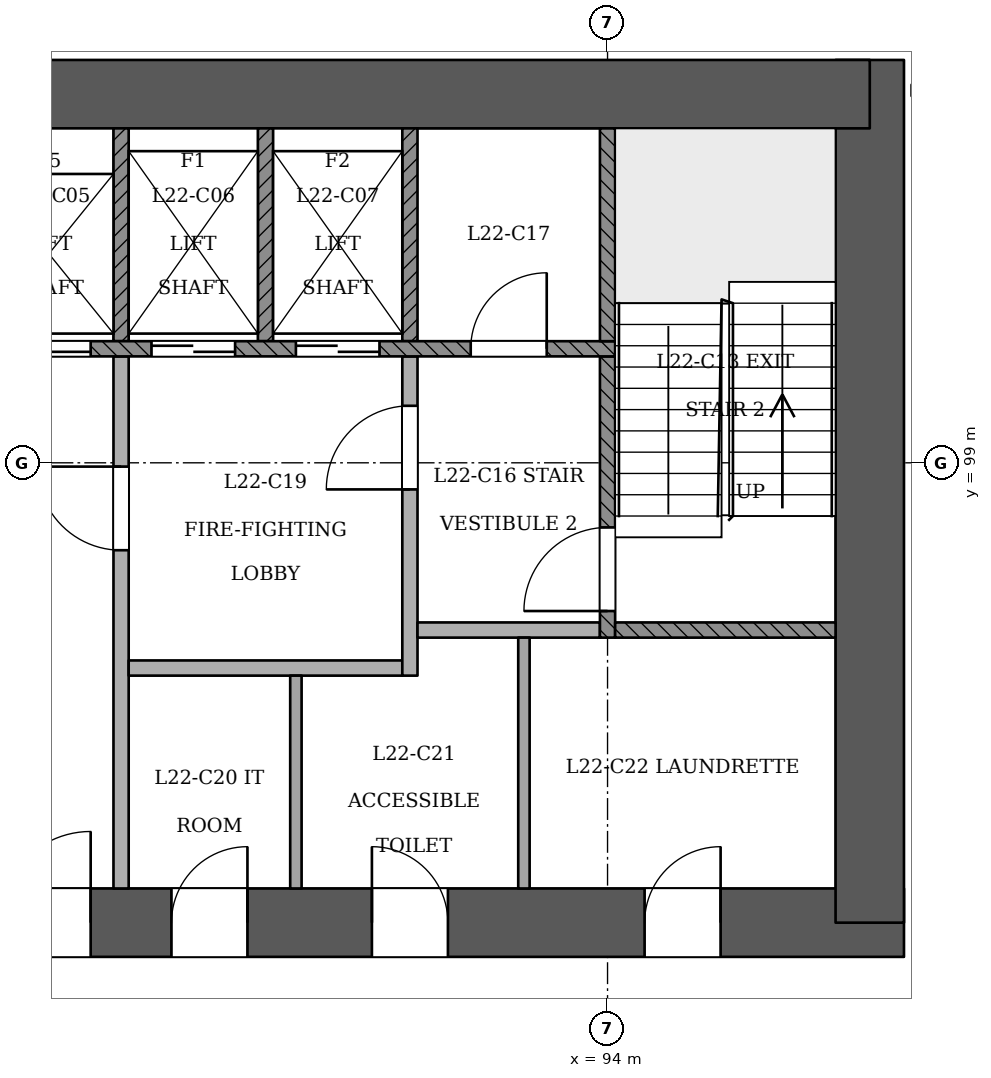
"""IFC4 building model, lengths in metres.
Left out: names, types, materials, properties, quantities, classifications, styles, units other than length and angle.
Written with IfcOpenShell. Run it as: python <this file> out.ifc"""

import sys

from ifc_helpers import new_model, si_unit, direction, frame, frame_2d, origin, place, context, subcontext, project, spatial, rectangle, extrude, element, fill, save


model = new_model("IFC4")
c1 = context("Model", 3, precision=1e-05, world=origin(), true_north=direction((0.0, 1.0)))
c2 = subcontext(c1, "Body", "Model", "MODEL_VIEW")
j1 = project(units=[si_unit("LENGTHUNIT", "METRE"), si_unit("PLANEANGLEUNIT", "RADIAN")], contexts=[c1])
p1 = place(None, origin())
s1 = spatial("IfcSite", under=j1, at=p1, CompositionType="ELEMENT")
p2 = place(p1, origin())
s2 = spatial("IfcBuilding", under=s1, at=p2, CompositionType="ELEMENT")
p3 = place(p2, frame((0.0, 0.0, 88.2)))
s3 = spatial("IfcBuildingStorey", under=s2, at=p3, CompositionType="ELEMENT", Elevation=88.2)
p4 = place(p3, frame((72.55, 92.95, 0.0), z_axis=(0.0, 0.0, 1.0), x_axis=(1.0, 0.0, 0.0)))
e1 = element("IfcWall", 1, at=p4, inside=s3, PredefinedType="SHEAR", context=c2, shape_type="SweptSolid", body=[
    extrude(rectangle(XDim=25.35, YDim=0.9, at=frame_2d((12.675, 0.0))), origin(), (0.0, 0.0, 1.0), 3.6),
])
p5 = place(p4, frame((1.25, 0.0, 0.0)))
e2 = element("IfcOpeningElement", 2, at=p5, cuts=e1, PredefinedType="OPENING", context=c2, shape_type="SweptSolid", body=[
    extrude(rectangle(XDim=1.2, YDim=2.1, at=frame_2d((0.6, 1.05))), frame((0.0, 0.46, 0.0), z_axis=(0.0, -1.0, 0.0), x_axis=(1.0, 0.0, 0.0)), (0.0, 0.0, 1.0), 0.921),
])
p6 = place(p4, frame((3.45, 0.0, 0.0)))
e3 = element("IfcOpeningElement", 3, at=p6, cuts=e1, PredefinedType="OPENING", context=c2, shape_type="SweptSolid", body=[
    extrude(rectangle(XDim=1.2, YDim=2.1, at=frame_2d((0.6, 1.05))), frame((0.0, 0.46, 0.0), z_axis=(0.0, -1.0, 0.0), x_axis=(1.0, 0.0, 0.0)), (0.0, 0.0, 1.0), 0.921),
])
p7 = place(p4, frame((13.45, 0.0, 0.0)))
e4 = element("IfcOpeningElement", 4, at=p7, cuts=e1, PredefinedType="OPENING", context=c2, shape_type="SweptSolid", body=[
    extrude(rectangle(XDim=1.2, YDim=2.1, at=frame_2d((0.6, 1.05))), frame((0.0, 0.46, 0.0), z_axis=(0.0, -1.0, 0.0), x_axis=(1.0, 0.0, 0.0)), (0.0, 0.0, 1.0), 0.921),
])
p8 = place(p4, frame((15.712, 0.0, 0.0)))
e5 = element("IfcOpeningElement", 5, at=p8, cuts=e1, PredefinedType="OPENING", context=c2, shape_type="SweptSolid", body=[
    extrude(rectangle(XDim=1.0, YDim=2.1, at=frame_2d((0.5, 1.05))), frame((0.0, 0.46, 0.0), z_axis=(0.0, -1.0, 0.0), x_axis=(1.0, 0.0, 0.0)), (0.0, 0.0, 1.0), 0.921),
])
p9 = place(p4, frame((18.35, 0.0, 0.0)))
e6 = element("IfcOpeningElement", 6, at=p9, cuts=e1, PredefinedType="OPENING", context=c2, shape_type="SweptSolid", body=[
    extrude(rectangle(XDim=1.0, YDim=2.1, at=frame_2d((0.5, 1.05))), frame((0.0, 0.46, 0.0), z_axis=(0.0, -1.0, 0.0), x_axis=(1.0, 0.0, 0.0)), (0.0, 0.0, 1.0), 0.921),
])
p10 = place(p4, frame((21.938, 0.0, 0.0)))
e7 = element("IfcOpeningElement", 7, at=p10, cuts=e1, PredefinedType="OPENING", context=c2, shape_type="SweptSolid", body=[
    extrude(rectangle(XDim=1.0, YDim=2.1, at=frame_2d((0.5, 1.05))), frame((0.0, 0.46, 0.0), z_axis=(0.0, -1.0, 0.0), x_axis=(1.0, 0.0, 0.0)), (0.0, 0.0, 1.0), 0.921),
])
p11 = place(p3, frame((97.45, 92.95, 0.0), z_axis=(0.0, 0.0, 1.0), x_axis=(0.0, 1.0, 0.0)))
e8 = element("IfcWall", 8, at=p11, inside=s3, PredefinedType="SHEAR", context=c2, shape_type="SweptSolid", body=[
    extrude(rectangle(XDim=11.35, YDim=0.9, at=frame_2d((5.675, 0.0))), origin(), (0.0, 0.0, 1.0), 3.6),
])
p12 = place(p3, frame((97.45, 103.85, 0.0), z_axis=(0.0, 0.0, 1.0), x_axis=(-1.0, 0.0, 0.0)))
e9 = element("IfcWall", 9, at=p12, inside=s3, PredefinedType="SHEAR", context=c2, shape_type="SweptSolid", body=[
    extrude(rectangle(XDim=25.35, YDim=0.9, at=frame_2d((12.675, 0.0))), origin(), (0.0, 0.0, 1.0), 3.6),
])
p13 = place(p3, frame((87.198, 63.517, 0.0), z_axis=(0.0, 0.0, 1.0), x_axis=(0.499999136801, 0.866025902152, 0.0)))
e10 = element("IfcWall", 10, at=p13, inside=s3, PredefinedType="PARTITIONING", context=c2, shape_type="SweptSolid", body=[
    extrude(rectangle(XDim=39.209, YDim=0.15, at=frame_2d((19.604, 0.0))), origin(), (0.0, 0.0, 1.0), 2.7),
])
p14 = place(p13, frame((2.8, 0.0, 0.0)))
e11 = element("IfcOpeningElement", 11, at=p14, cuts=e10, PredefinedType="OPENING", context=c2, shape_type="SweptSolid", body=[
    extrude(rectangle(XDim=1.2, YDim=2.1, at=frame_2d((0.6, 1.05))), frame((0.0, 0.085, 0.0), z_axis=(0.0, -1.0, 0.0), x_axis=(1.0, 0.0, 0.0)), (0.0, 0.0, 1.0), 0.171),
])
p15 = place(p13, frame((9.72, 0.0, 0.0)))
e12 = element("IfcOpeningElement", 12, at=p15, cuts=e10, PredefinedType="OPENING", context=c2, shape_type="SweptSolid", body=[
    extrude(rectangle(XDim=1.0, YDim=2.1, at=frame_2d((0.5, 1.05))), frame((0.0, 0.085, 0.0), z_axis=(0.0, -1.0, 0.0), x_axis=(1.0, 0.0, 0.0)), (0.0, 0.0, 1.0), 0.171),
])
p16 = place(p13, frame((16.395, 0.0, 0.0)))
e13 = element("IfcOpeningElement", 13, at=p16, cuts=e10, PredefinedType="OPENING", context=c2, shape_type="SweptSolid", body=[
    extrude(rectangle(XDim=1.0, YDim=2.1, at=frame_2d((0.5, 1.05))), frame((0.0, 0.085, 0.0), z_axis=(0.0, -1.0, 0.0), x_axis=(1.0, 0.0, 0.0)), (0.0, 0.0, 1.0), 0.171),
])
p17 = place(p13, frame((19.75, 0.0, 0.0)))
e14 = element("IfcOpeningElement", 14, at=p17, cuts=e10, PredefinedType="OPENING", context=c2, shape_type="SweptSolid", body=[
    extrude(rectangle(XDim=1.0, YDim=2.1, at=frame_2d((0.5, 1.05))), frame((0.0, 0.085, 0.0), z_axis=(0.0, -1.0, 0.0), x_axis=(1.0, 0.0, 0.0)), (0.0, 0.0, 1.0), 0.171),
])
p18 = place(p13, frame((25.395, 0.0, 0.0)))
e15 = element("IfcOpeningElement", 15, at=p18, cuts=e10, PredefinedType="OPENING", context=c2, shape_type="SweptSolid", body=[
    extrude(rectangle(XDim=1.0, YDim=2.1, at=frame_2d((0.5, 1.05))), frame((0.0, 0.085, 0.0), z_axis=(0.0, -1.0, 0.0), x_axis=(1.0, 0.0, 0.0)), (0.0, 0.0, 1.0), 0.171),
])
p19 = place(p13, frame((29.8, 0.0, 0.0)))
e16 = element("IfcOpeningElement", 16, at=p19, cuts=e10, PredefinedType="OPENING", context=c2, shape_type="SweptSolid", body=[
    extrude(rectangle(XDim=1.2, YDim=2.1, at=frame_2d((0.6, 1.05))), frame((0.0, 0.085, 0.0), z_axis=(0.0, -1.0, 0.0), x_axis=(1.0, 0.0, 0.0)), (0.0, 0.0, 1.0), 0.171),
])
p20 = place(p13, frame((37.225, 0.0, 0.0)))
e17 = element("IfcOpeningElement", 17, at=p20, cuts=e10, PredefinedType="OPENING", context=c2, shape_type="SweptSolid", body=[
    extrude(rectangle(XDim=1.0, YDim=2.1, at=frame_2d((0.5, 1.05))), frame((0.0, 0.085, 0.0), z_axis=(0.0, -1.0, 0.0), x_axis=(1.0, 0.0, 0.0)), (0.0, 0.0, 1.0), 0.171),
])
p21 = place(p3, frame((87.6, 93.4, 0.0), z_axis=(0.0, 0.0, 1.0), x_axis=(0.0, 1.0, 0.0)))
e18 = element("IfcWall", 18, at=p21, inside=s3, PredefinedType="PARTITIONING", context=c2, shape_type="SweptSolid", body=[
    extrude(rectangle(XDim=7.0, YDim=0.2, at=frame_2d((3.5, 0.0))), origin(), (0.0, 0.0, 1.0), 3.1),
])
p22 = place(p21, frame((4.45, 0.0, 0.0)))
e19 = element("IfcOpeningElement", 19, at=p22, cuts=e18, PredefinedType="OPENING", context=c2, shape_type="SweptSolid", body=[
    extrude(rectangle(XDim=1.1, YDim=2.1, at=frame_2d((0.55, 1.05))), frame((0.0, 0.11, 0.0), z_axis=(0.0, -1.0, 0.0), x_axis=(1.0, 0.0, 0.0)), (0.0, 0.0, 1.0), 0.221),
])
p23 = place(p3, frame((89.9, 93.4, 0.0), z_axis=(0.0, 0.0, 1.0), x_axis=(0.0, 1.0, 0.0)))
e20 = element("IfcWall", 20, at=p23, inside=s3, PredefinedType="PARTITIONING", context=c2, shape_type="SweptSolid", body=[
    extrude(rectangle(XDim=2.8, YDim=0.15, at=frame_2d((1.4, 0.0))), origin(), (0.0, 0.0, 1.0), 3.1),
])
p24 = place(p3, frame((92.9, 93.4, 0.0), z_axis=(0.0, 0.0, 1.0), x_axis=(0.0, 1.0, 0.0)))
e21 = element("IfcWall", 21, at=p24, inside=s3, PredefinedType="PARTITIONING", context=c2, shape_type="SweptSolid", body=[
    extrude(rectangle(XDim=3.3, YDim=0.15, at=frame_2d((1.65, 0.0))), origin(), (0.0, 0.0, 1.0), 3.1),
])
p25 = place(p3, frame((87.7, 96.3, 0.0), z_axis=(0.0, 0.0, 1.0), x_axis=(1.0, 0.0, 0.0)))
e22 = element("IfcWall", 22, at=p25, inside=s3, PredefinedType="PARTITIONING", context=c2, shape_type="SweptSolid", body=[
    extrude(rectangle(XDim=3.6, YDim=0.2, at=frame_2d((1.8, 0.0))), origin(), (0.0, 0.0, 1.0), 3.1),
])
p26 = place(p3, frame((91.4, 96.2, 0.0), z_axis=(0.0, 0.0, 1.0), x_axis=(0.0, 1.0, 0.0)))
e23 = element("IfcWall", 23, at=p26, inside=s3, PredefinedType="PARTITIONING", context=c2, shape_type="SweptSolid", body=[
    extrude(rectangle(XDim=4.2, YDim=0.2, at=frame_2d((2.1, 0.0))), origin(), (0.0, 0.0, 1.0), 3.1),
])
p27 = place(p26, frame((2.45, 0.0, 0.0)))
e24 = element("IfcOpeningElement", 24, at=p27, cuts=e23, PredefinedType="OPENING", context=c2, shape_type="SweptSolid", body=[
    extrude(rectangle(XDim=1.1, YDim=2.1, at=frame_2d((0.55, 1.05))), frame((0.0, 0.11, 0.0), z_axis=(0.0, -1.0, 0.0), x_axis=(1.0, 0.0, 0.0)), (0.0, 0.0, 1.0), 0.221),
])
p28 = place(p3, frame((91.5, 96.8, 0.0), z_axis=(0.0, 0.0, 1.0), x_axis=(1.0, 0.0, 0.0)))
e25 = element("IfcWall", 25, at=p28, inside=s3, PredefinedType="PARTITIONING", context=c2, shape_type="SweptSolid", body=[
    extrude(rectangle(XDim=2.4, YDim=0.2, at=frame_2d((1.2, 0.0))), origin(), (0.0, 0.0, 1.0), 3.1),
])
p29 = place(p3, frame((94.0, 96.7, 0.0), z_axis=(0.0, 0.0, 1.0), x_axis=(0.0, 1.0, 0.0)))
e26 = element("IfcWall", 26, at=p29, inside=s3, PredefinedType="SOLIDWALL", context=c2, shape_type="SweptSolid", body=[
    extrude(rectangle(XDim=3.7, YDim=0.2, at=frame_2d((1.85, 0.0))), origin(), (0.0, 0.0, 1.0), 3.1),
])
p30 = place(p29, frame((0.35, 0.0, 0.0)))
e27 = element("IfcOpeningElement", 27, at=p30, cuts=e26, PredefinedType="OPENING", context=c2, shape_type="SweptSolid", body=[
    extrude(rectangle(XDim=1.1, YDim=2.1, at=frame_2d((0.55, 1.05))), frame((0.0, 0.11, 0.0), z_axis=(0.0, -1.0, 0.0), x_axis=(1.0, 0.0, 0.0)), (0.0, 0.0, 1.0), 0.221),
])
p31 = place(p3, frame((94.1, 96.8, 0.0), z_axis=(0.0, 0.0, 1.0), x_axis=(1.0, 0.0, 0.0)))
e28 = element("IfcWall", 28, at=p31, inside=s3, PredefinedType="SOLIDWALL", context=c2, shape_type="SweptSolid", body=[
    extrude(rectangle(XDim=2.9, YDim=0.2, at=frame_2d((1.45, 0.0))), origin(), (0.0, 0.0, 1.0), 3.1),
])
p32 = place(p3, frame((75.9, 100.5, 0.0), z_axis=(0.0, 0.0, 1.0), x_axis=(1.0, 0.0, 0.0)))
e29 = element("IfcWall", 29, at=p32, inside=s3, PredefinedType="SOLIDWALL", context=c2, shape_type="SweptSolid", body=[
    extrude(rectangle(XDim=18.2, YDim=0.2, at=frame_2d((9.1, 0.0))), origin(), (0.0, 0.0, 1.0), 3.1),
])
p33 = place(p32, frame((2.6, 0.0, 0.0)))
e30 = element("IfcOpeningElement", 30, at=p33, cuts=e29, PredefinedType="OPENING", context=c2, shape_type="SweptSolid", body=[
    extrude(rectangle(XDim=1.1, YDim=2.1, at=frame_2d((0.55, 1.05))), frame((0.0, 0.11, 0.0), z_axis=(0.0, -1.0, 0.0), x_axis=(1.0, 0.0, 0.0)), (0.0, 0.0, 1.0), 0.221),
])
p34 = place(p32, frame((4.5, 0.0, 0.0)))
e31 = element("IfcOpeningElement", 31, at=p34, cuts=e29, PredefinedType="OPENING", context=c2, shape_type="SweptSolid", body=[
    extrude(rectangle(XDim=1.1, YDim=2.1, at=frame_2d((0.55, 1.05))), frame((0.0, 0.11, 0.0), z_axis=(0.0, -1.0, 0.0), x_axis=(1.0, 0.0, 0.0)), (0.0, 0.0, 1.0), 0.221),
])
p35 = place(p32, frame((6.4, 0.0, 0.0)))
e32 = element("IfcOpeningElement", 32, at=p35, cuts=e29, PredefinedType="OPENING", context=c2, shape_type="SweptSolid", body=[
    extrude(rectangle(XDim=1.1, YDim=2.1, at=frame_2d((0.55, 1.05))), frame((0.0, 0.11, 0.0), z_axis=(0.0, -1.0, 0.0), x_axis=(1.0, 0.0, 0.0)), (0.0, 0.0, 1.0), 0.221),
])
p36 = place(p32, frame((8.3, 0.0, 0.0)))
e33 = element("IfcOpeningElement", 33, at=p36, cuts=e29, PredefinedType="OPENING", context=c2, shape_type="SweptSolid", body=[
    extrude(rectangle(XDim=1.1, YDim=2.1, at=frame_2d((0.55, 1.05))), frame((0.0, 0.11, 0.0), z_axis=(0.0, -1.0, 0.0), x_axis=(1.0, 0.0, 0.0)), (0.0, 0.0, 1.0), 0.221),
])
p37 = place(p32, frame((10.2, 0.0, 0.0)))
e34 = element("IfcOpeningElement", 34, at=p37, cuts=e29, PredefinedType="OPENING", context=c2, shape_type="SweptSolid", body=[
    extrude(rectangle(XDim=1.1, YDim=2.1, at=frame_2d((0.55, 1.05))), frame((0.0, 0.11, 0.0), z_axis=(0.0, -1.0, 0.0), x_axis=(1.0, 0.0, 0.0)), (0.0, 0.0, 1.0), 0.221),
])
p38 = place(p32, frame((12.1, 0.0, 0.0)))
e35 = element("IfcOpeningElement", 35, at=p38, cuts=e29, PredefinedType="OPENING", context=c2, shape_type="SweptSolid", body=[
    extrude(rectangle(XDim=1.1, YDim=2.1, at=frame_2d((0.55, 1.05))), frame((0.0, 0.11, 0.0), z_axis=(0.0, -1.0, 0.0), x_axis=(1.0, 0.0, 0.0)), (0.0, 0.0, 1.0), 0.221),
])
p39 = place(p32, frame((14.0, 0.0, 0.0)))
e36 = element("IfcOpeningElement", 36, at=p39, cuts=e29, PredefinedType="OPENING", context=c2, shape_type="SweptSolid", body=[
    extrude(rectangle(XDim=1.1, YDim=2.1, at=frame_2d((0.55, 1.05))), frame((0.0, 0.11, 0.0), z_axis=(0.0, -1.0, 0.0), x_axis=(1.0, 0.0, 0.0)), (0.0, 0.0, 1.0), 0.221),
])
p40 = place(p32, frame((0.65, 0.0, 0.0)))
e37 = element("IfcOpeningElement", 37, at=p40, cuts=e29, PredefinedType="OPENING", context=c2, shape_type="SweptSolid", body=[
    extrude(rectangle(XDim=1.0, YDim=2.1, at=frame_2d((0.5, 1.05))), frame((0.0, 0.11, 0.0), z_axis=(0.0, -1.0, 0.0), x_axis=(1.0, 0.0, 0.0)), (0.0, 0.0, 1.0), 0.221),
])
p41 = place(p32, frame((16.3, 0.0, 0.0)))
e38 = element("IfcOpeningElement", 38, at=p41, cuts=e29, PredefinedType="OPENING", context=c2, shape_type="SweptSolid", body=[
    extrude(rectangle(XDim=1.0, YDim=2.1, at=frame_2d((0.5, 1.05))), frame((0.0, 0.11, 0.0), z_axis=(0.0, -1.0, 0.0), x_axis=(1.0, 0.0, 0.0)), (0.0, 0.0, 1.0), 0.221),
])
for number, where, z_axis, x_axis in (
    (39, (87.6, 100.6, 0.0), (0.0, 0.0, 1.0), (0.0, 1.0, 0.0)),
    (40, (89.5, 100.6, 0.0), (0.0, 0.0, 1.0), (0.0, 1.0, 0.0)),
    (41, (91.4, 100.6, 0.0), (0.0, 0.0, 1.0), (0.0, 1.0, 0.0)),
    (42, (94.0, 100.6, 0.0), (0.0, 0.0, 1.0), (0.0, 1.0, 0.0)),
):
    element("IfcWall", number, at=place(p3, frame(where, z_axis=z_axis, x_axis=x_axis)), inside=s3, PredefinedType="SOLIDWALL", context=c2, shape_type="SweptSolid", body=[
        extrude(rectangle(XDim=2.8, YDim=0.2, at=frame_2d((1.4, 0.0))), origin(), (0.0, 0.0, 1.0), 3.1),
    ])
p42 = place(p37, origin())
e43 = element("IfcDoor", 43, at=p42, inside=s3, OperationType="SLIDING_TO_RIGHT", PredefinedType="NOTDEFINED", context=c2, shape_type="SweptSolid", body=[
    extrude(rectangle(XDim=1.1, YDim=2.1, at=frame_2d((0.55, 1.05))), frame((0.0, 0.025, 0.0), z_axis=(0.0, -1.0, 0.0), x_axis=(1.0, 0.0, 0.0)), (0.0, 0.0, 1.0), 0.05),
])
fill(e34, e43)
p43 = place(p38, origin())
e44 = element("IfcDoor", 44, at=p43, inside=s3, OperationType="SLIDING_TO_RIGHT", PredefinedType="NOTDEFINED", context=c2, shape_type="SweptSolid", body=[
    extrude(rectangle(XDim=1.1, YDim=2.1, at=frame_2d((0.55, 1.05))), frame((0.0, 0.025, 0.0), z_axis=(0.0, -1.0, 0.0), x_axis=(1.0, 0.0, 0.0)), (0.0, 0.0, 1.0), 0.05),
])
fill(e35, e44)
p44 = place(p39, origin())
e45 = element("IfcDoor", 45, at=p44, inside=s3, OperationType="SLIDING_TO_LEFT", PredefinedType="NOTDEFINED", context=c2, shape_type="SweptSolid", body=[
    extrude(rectangle(XDim=1.1, YDim=2.1, at=frame_2d((0.55, 1.05))), frame((0.0, 0.025, 0.0), z_axis=(0.0, -1.0, 0.0), x_axis=(1.0, 0.0, 0.0)), (0.0, 0.0, 1.0), 0.05),
])
fill(e36, e45)
p45 = place(p30, origin())
e46 = element("IfcDoor", 46, at=p45, inside=s3, OperationType="SINGLE_SWING_LEFT", PredefinedType="NOTDEFINED", context=c2, shape_type="SweptSolid", body=[
    extrude(rectangle(XDim=1.1, YDim=2.1, at=frame_2d((0.55, 1.05))), frame((0.0, 0.025, 0.0), z_axis=(0.0, -1.0, 0.0), x_axis=(1.0, 0.0, 0.0)), (0.0, 0.0, 1.0), 0.05),
])
fill(e27, e46)
p46 = place(p22, origin())
e47 = element("IfcDoor", 47, at=p46, inside=s3, OperationType="SINGLE_SWING_RIGHT", PredefinedType="NOTDEFINED", context=c2, shape_type="SweptSolid", body=[
    extrude(rectangle(XDim=1.1, YDim=2.1, at=frame_2d((0.55, 1.05))), frame((0.0, 0.025, 0.0), z_axis=(0.0, -1.0, 0.0), x_axis=(1.0, 0.0, 0.0)), (0.0, 0.0, 1.0), 0.05),
])
fill(e19, e47)
p47 = place(p27, origin())
e48 = element("IfcDoor", 48, at=p47, inside=s3, OperationType="SINGLE_SWING_LEFT", PredefinedType="NOTDEFINED", context=c2, shape_type="SweptSolid", body=[
    extrude(rectangle(XDim=1.1, YDim=2.1, at=frame_2d((0.55, 1.05))), frame((0.0, 0.025, 0.0), z_axis=(0.0, -1.0, 0.0), x_axis=(1.0, 0.0, 0.0)), (0.0, 0.0, 1.0), 0.05),
])
fill(e24, e48)
p48 = place(p7, origin())
e49 = element("IfcDoor", 49, at=p48, inside=s3, OperationType="SINGLE_SWING_RIGHT", PredefinedType="NOTDEFINED", context=c2, shape_type="SweptSolid", body=[
    extrude(rectangle(XDim=1.2, YDim=2.1, at=frame_2d((0.6, 1.05))), frame((0.0, 0.025, 0.0), z_axis=(0.0, -1.0, 0.0), x_axis=(1.0, 0.0, 0.0)), (0.0, 0.0, 1.0), 0.05),
])
fill(e4, e49)
p49 = place(p41, origin())
e50 = element("IfcDoor", 50, at=p49, inside=s3, OperationType="SINGLE_SWING_RIGHT", PredefinedType="NOTDEFINED", context=c2, shape_type="SweptSolid", body=[
    extrude(rectangle(XDim=1.0, YDim=2.1, at=frame_2d((0.5, 1.05))), frame((0.0, 0.025, 0.0), z_axis=(0.0, -1.0, 0.0), x_axis=(1.0, 0.0, 0.0)), (0.0, 0.0, 1.0), 0.05),
])
fill(e38, e50)
p50 = place(p8, origin())
e51 = element("IfcDoor", 51, at=p50, inside=s3, OperationType="SINGLE_SWING_RIGHT", PredefinedType="NOTDEFINED", context=c2, shape_type="SweptSolid", body=[
    extrude(rectangle(XDim=1.0, YDim=2.1, at=frame_2d((0.5, 1.05))), frame((0.0, 0.025, 0.0), z_axis=(0.0, -1.0, 0.0), x_axis=(1.0, 0.0, 0.0)), (0.0, 0.0, 1.0), 0.05),
])
fill(e5, e51)
p51 = place(p9, origin())
e52 = element("IfcDoor", 52, at=p51, inside=s3, OperationType="SINGLE_SWING_LEFT", PredefinedType="NOTDEFINED", context=c2, shape_type="SweptSolid", body=[
    extrude(rectangle(XDim=1.0, YDim=2.1, at=frame_2d((0.5, 1.05))), frame((0.0, 0.025, 0.0), z_axis=(0.0, -1.0, 0.0), x_axis=(1.0, 0.0, 0.0)), (0.0, 0.0, 1.0), 0.05),
])
fill(e6, e52)
p52 = place(p10, origin())
e53 = element("IfcDoor", 53, at=p52, inside=s3, OperationType="SINGLE_SWING_RIGHT", PredefinedType="NOTDEFINED", context=c2, shape_type="SweptSolid", body=[
    extrude(rectangle(XDim=1.0, YDim=2.1, at=frame_2d((0.5, 1.05))), frame((0.0, 0.025, 0.0), z_axis=(0.0, -1.0, 0.0), x_axis=(1.0, 0.0, 0.0)), (0.0, 0.0, 1.0), 0.05),
])
fill(e7, e53)
save(model, sys.argv[1])
